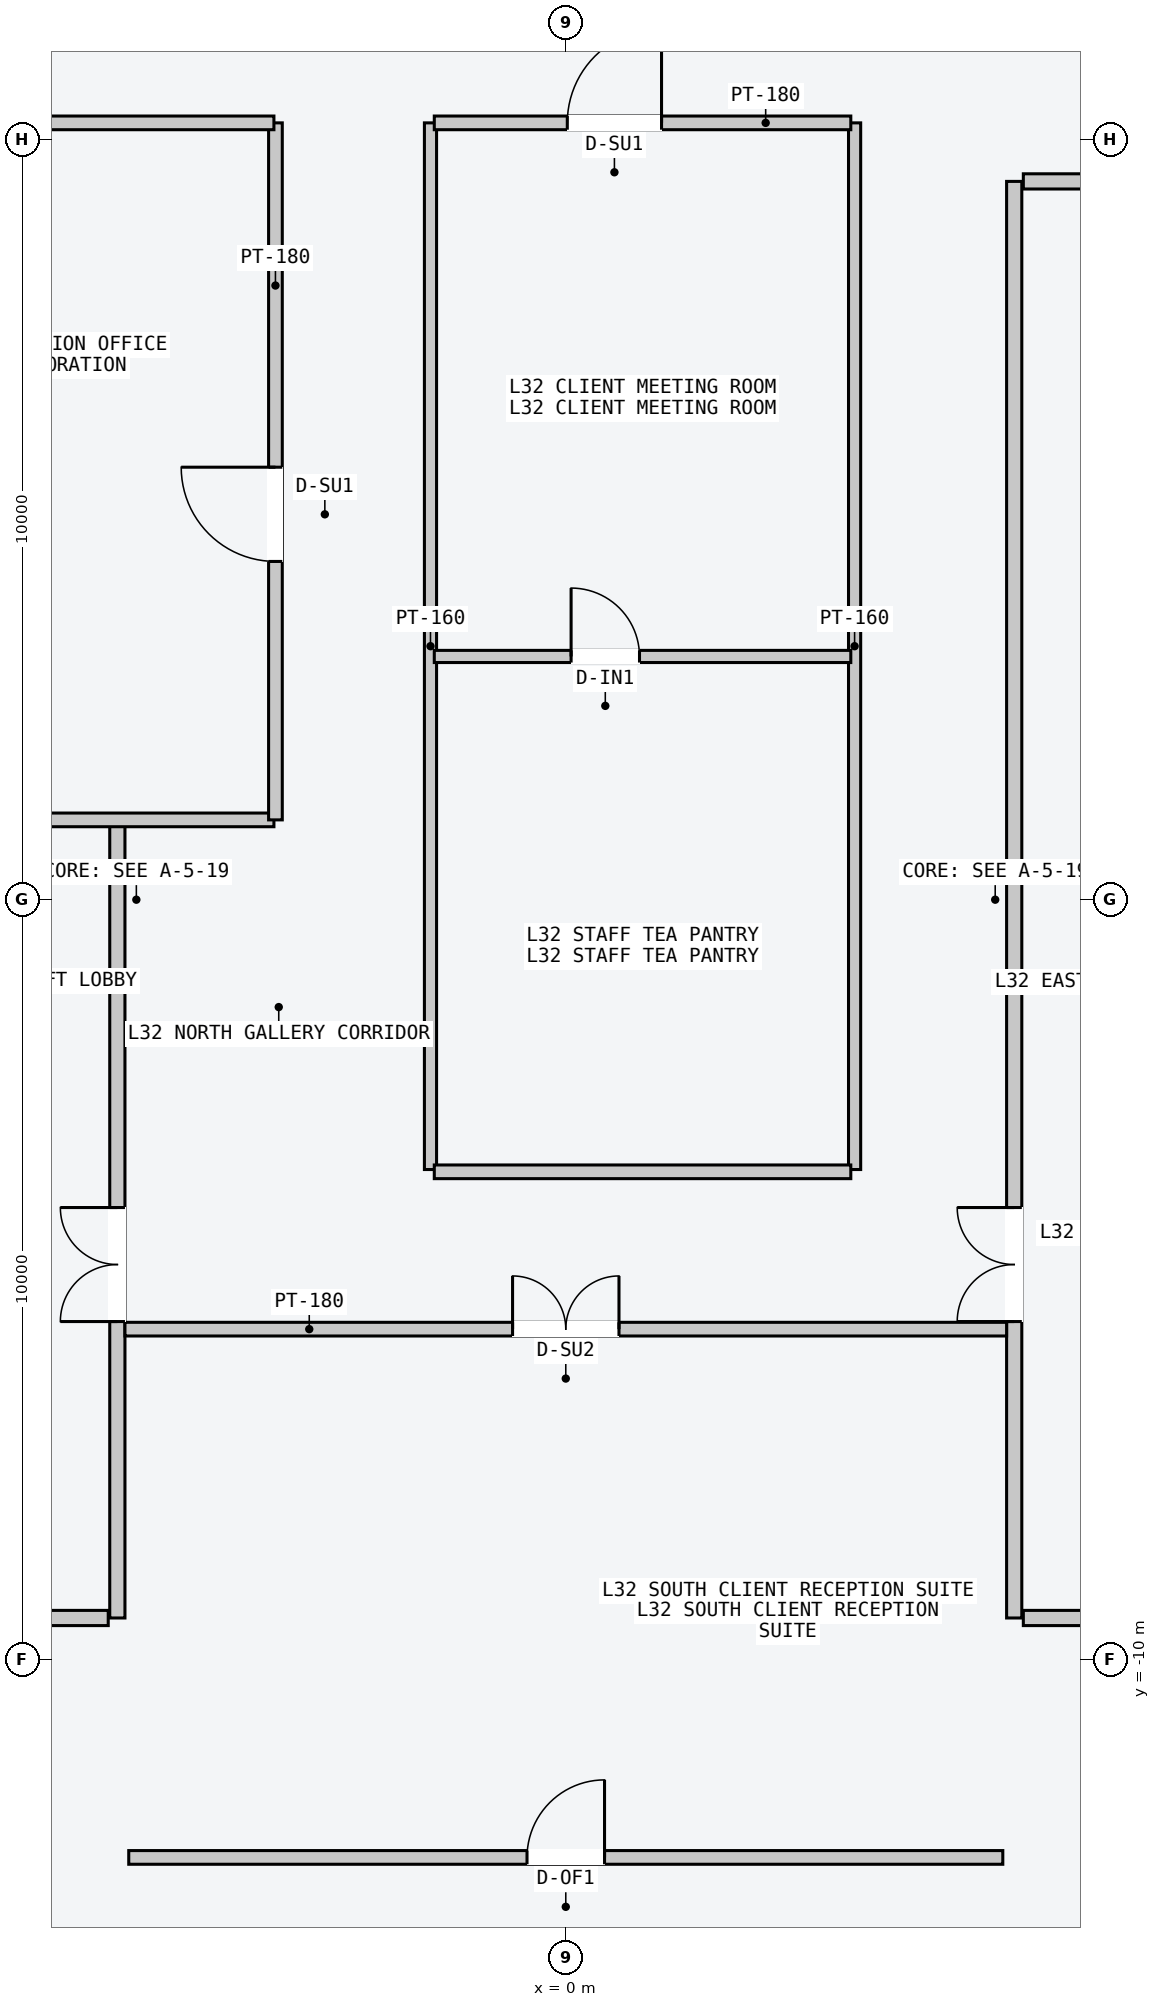
"""IFC4 building model, lengths in metres.
Left out: names, types, materials, properties, quantities, classifications, styles, units other than length and angle.
Written with IfcOpenShell. Run it as: python <this file> out.ifc"""

import sys

from ifc_helpers import new_model, si_unit, direction, frame, frame_2d, origin, place, context, subcontext, project, spatial, rectangle, extrude, element, fill, save


model = new_model("IFC4")
c1 = context("Model", 3, precision=1e-05, world=origin(), true_north=direction((0.0, 1.0)))
c2 = subcontext(c1, "Body", "Model", "MODEL_VIEW")
j1 = project(units=[si_unit("LENGTHUNIT", "METRE"), si_unit("PLANEANGLEUNIT", "RADIAN")], contexts=[c1])
p1 = place(None, origin())
s1 = spatial("IfcSite", under=j1, at=p1, CompositionType="ELEMENT")
p2 = place(p1, origin())
s2 = spatial("IfcBuilding", under=s1, at=p2, CompositionType="ELEMENT")
p3 = place(p2, frame((0.0, 0.0, 124.2)))
s3 = spatial("IfcBuildingStorey", under=s2, at=p3, CompositionType="ELEMENT", Elevation=124.2)
p4 = place(p3, frame((-5.9, -9.45, 0.0), z_axis=(0.0, 0.0, 1.0), x_axis=(0.0, 1.0, 0.0)))
e1 = element("IfcWall", 1, at=p4, inside=s3, PredefinedType="PARTITIONING", context=c2, shape_type="SweptSolid", body=[
    extrude(rectangle(XDim=10.5, YDim=0.2, at=frame_2d((5.25, 0.0))), origin(), (0.0, 0.0, 1.0), 3.4),
])
p5 = place(p4, frame((3.9, 0.0, 0.0)))
e2 = element("IfcOpeningElement", 2, at=p5, cuts=e1, PredefinedType="OPENING", context=c2, shape_type="SweptSolid", body=[
    extrude(rectangle(XDim=1.5, YDim=2.2, at=frame_2d((0.75, 1.1))), frame((0.0, 0.11, 0.0), z_axis=(0.0, -1.0, 0.0), x_axis=(1.0, 0.0, 0.0)), (0.0, 0.0, 1.0), 0.22),
])
p6 = place(p3, frame((-6.02, -9.45, 0.0), z_axis=(0.0, 0.0, 1.0), x_axis=(-1.0, 0.0, 0.0)))
e3 = element("IfcWall", 3, at=p6, inside=s3, PredefinedType="PARTITIONING", context=c2, shape_type="SweptSolid", body=[
    extrude(rectangle(XDim=1.8, YDim=0.2, at=frame_2d((0.9, 0.0))), origin(), (0.0, 0.0, 1.0), 3.4),
])
p7 = place(p3, frame((5.9, -9.45, 0.0), z_axis=(0.0, 0.0, 1.0), x_axis=(0.0, 1.0, 0.0)))
e4 = element("IfcWall", 4, at=p7, inside=s3, PredefinedType="PARTITIONING", context=c2, shape_type="SweptSolid", body=[
    extrude(rectangle(XDim=18.9, YDim=0.2, at=frame_2d((9.45, 0.0))), origin(), (0.0, 0.0, 1.0), 3.4),
])
p8 = place(p7, frame((3.9, 0.0, 0.0)))
e5 = element("IfcOpeningElement", 5, at=p8, cuts=e4, PredefinedType="OPENING", context=c2, shape_type="SweptSolid", body=[
    extrude(rectangle(XDim=1.5, YDim=2.2, at=frame_2d((0.75, 1.1))), frame((0.0, 0.11, 0.0), z_axis=(0.0, -1.0, 0.0), x_axis=(1.0, 0.0, 0.0)), (0.0, 0.0, 1.0), 0.22),
])
for number, where, z_axis, x_axis in (
    (6, (6.02, -9.45, 0.0), (0.0, 0.0, 1.0), (1.0, 0.0, 0.0)),
    (7, (6.02, 9.45, 0.0), (0.0, 0.0, 1.0), (1.0, 0.0, 0.0)),
):
    element("IfcWall", number, at=place(p3, frame(where, z_axis=z_axis, x_axis=x_axis)), inside=s3, PredefinedType="PARTITIONING", context=c2, shape_type="SweptSolid", body=[
        extrude(rectangle(XDim=1.8, YDim=0.2, at=frame_2d((0.9, 0.0))), origin(), (0.0, 0.0, 1.0), 3.4),
    ])
p9 = place(p3, frame((-10.05, 1.05, 0.0), z_axis=(0.0, 0.0, 1.0), x_axis=(1.0, 0.0, 0.0)))
e8 = element("IfcWall", 8, at=p9, inside=s3, PredefinedType="PARTITIONING", context=c2, shape_type="SweptSolid", body=[
    extrude(rectangle(XDim=6.21, YDim=0.18, at=frame_2d((3.105, 0.0))), origin(), (0.0, 0.0, 1.0), 3.4),
])
p10 = place(p3, frame((-3.82, 1.05, 0.0), z_axis=(0.0, 0.0, 1.0), x_axis=(0.0, 1.0, 0.0)))
e9 = element("IfcWall", 9, at=p10, inside=s3, PredefinedType="PARTITIONING", context=c2, shape_type="SweptSolid", body=[
    extrude(rectangle(XDim=9.17, YDim=0.18, at=frame_2d((4.585, 0.0))), origin(), (0.0, 0.0, 1.0), 3.4),
])
p11 = place(p10, frame((3.4, 0.0, 0.0)))
e10 = element("IfcOpeningElement", 10, at=p11, cuts=e9, PredefinedType="OPENING", context=c2, shape_type="SweptSolid", body=[
    extrude(rectangle(XDim=1.24, YDim=2.24, at=frame_2d((0.62, 1.12))), frame((0.0, 0.1, 0.0), z_axis=(0.0, -1.0, 0.0), x_axis=(1.0, 0.0, 0.0)), (0.0, 0.0, 1.0), 0.2),
])
p12 = place(p3, frame((-7.5, 10.22, 0.0), z_axis=(0.0, 0.0, 1.0), x_axis=(1.0, 0.0, 0.0)))
e11 = element("IfcWall", 11, at=p12, inside=s3, PredefinedType="PARTITIONING", context=c2, shape_type="SweptSolid", body=[
    extrude(rectangle(XDim=3.66, YDim=0.18, at=frame_2d((1.83, 0.0))), origin(), (0.0, 0.0, 1.0), 3.4),
])
for number, where, z_axis, x_axis in (
    (12, (-1.78, -3.55, 0.0), (0.0, 0.0, 1.0), (0.0, 1.0, 0.0)),
    (13, (3.8, -3.55, 0.0), (0.0, 0.0, 1.0), (0.0, 1.0, 0.0)),
):
    element("IfcWall", number, at=place(p3, frame(where, z_axis=z_axis, x_axis=x_axis)), inside=s3, PredefinedType="PARTITIONING", context=c2, shape_type="SweptSolid", body=[
        extrude(rectangle(XDim=13.77, YDim=0.16, at=frame_2d((6.885, 0.0))), origin(), (0.0, 0.0, 1.0), 3.4),
    ])
p13 = place(p3, frame((-1.73, -3.58, 0.0), z_axis=(0.0, 0.0, 1.0), x_axis=(1.0, 0.0, 0.0)))
e14 = element("IfcWall", 14, at=p13, inside=s3, PredefinedType="PARTITIONING", context=c2, shape_type="SweptSolid", body=[
    extrude(rectangle(XDim=5.48, YDim=0.18, at=frame_2d((2.74, 0.0))), origin(), (0.0, 0.0, 1.0), 3.4),
])
p14 = place(p3, frame((-1.73, 3.2, 0.0), z_axis=(0.0, 0.0, 1.0), x_axis=(1.0, 0.0, 0.0)))
e15 = element("IfcWall", 15, at=p14, inside=s3, PredefinedType="PARTITIONING", context=c2, shape_type="SweptSolid", body=[
    extrude(rectangle(XDim=5.48, YDim=0.16, at=frame_2d((2.74, 0.0))), origin(), (0.0, 0.0, 1.0), 3.4),
])
p15 = place(p14, frame((1.8, 0.0, 0.0)))
e16 = element("IfcOpeningElement", 16, at=p15, cuts=e15, PredefinedType="OPENING", context=c2, shape_type="SweptSolid", body=[
    extrude(rectangle(XDim=0.9, YDim=2.15, at=frame_2d((0.45, 1.075))), frame((0.0, 0.09, 0.0), z_axis=(0.0, -1.0, 0.0), x_axis=(1.0, 0.0, 0.0)), (0.0, 0.0, 1.0), 0.18),
])
p16 = place(p3, frame((-1.73, 10.22, 0.0), z_axis=(0.0, 0.0, 1.0), x_axis=(1.0, 0.0, 0.0)))
e17 = element("IfcWall", 17, at=p16, inside=s3, PredefinedType="PARTITIONING", context=c2, shape_type="SweptSolid", body=[
    extrude(rectangle(XDim=5.48, YDim=0.18, at=frame_2d((2.74, 0.0))), origin(), (0.0, 0.0, 1.0), 3.4),
])
p17 = place(p16, frame((1.75, 0.0, 0.0)))
e18 = element("IfcOpeningElement", 18, at=p17, cuts=e17, PredefinedType="OPENING", context=c2, shape_type="SweptSolid", body=[
    extrude(rectangle(XDim=1.24, YDim=2.24, at=frame_2d((0.62, 1.12))), frame((0.0, 0.1, 0.0), z_axis=(0.0, -1.0, 0.0), x_axis=(1.0, 0.0, 0.0)), (0.0, 0.0, 1.0), 0.2),
])
p18 = place(p3, frame((-5.8, -5.65, 0.0), z_axis=(0.0, 0.0, 1.0), x_axis=(1.0, 0.0, 0.0)))
e19 = element("IfcWall", 19, at=p18, inside=s3, PredefinedType="PARTITIONING", context=c2, shape_type="SweptSolid", body=[
    extrude(rectangle(XDim=11.6, YDim=0.18, at=frame_2d((5.8, 0.0))), origin(), (0.0, 0.0, 1.0), 3.4),
])
p19 = place(p18, frame((5.1, 0.0, 0.0)))
e20 = element("IfcOpeningElement", 20, at=p19, cuts=e19, PredefinedType="OPENING", context=c2, shape_type="SweptSolid", body=[
    extrude(rectangle(XDim=1.4, YDim=2.2, at=frame_2d((0.7, 1.1))), frame((0.0, 0.1, 0.0), z_axis=(0.0, -1.0, 0.0), x_axis=(1.0, 0.0, 0.0)), (0.0, 0.0, 1.0), 0.2),
])
p20 = place(p3, frame((-5.75, -12.6, 0.0), z_axis=(0.0, 0.0, 1.0), x_axis=(1.0, 0.0, 0.0)))
e21 = element("IfcWall", 21, at=p20, inside=s3, PredefinedType="PARTITIONING", context=c2, shape_type="SweptSolid", body=[
    extrude(rectangle(XDim=11.5, YDim=0.18, at=frame_2d((5.75, 0.0))), origin(), (0.0, 0.0, 1.0), 3.4),
])
p21 = place(p20, frame((5.24, 0.0, 0.0)))
e22 = element("IfcOpeningElement", 22, at=p21, cuts=e21, PredefinedType="OPENING", context=c2, shape_type="SweptSolid", body=[
    extrude(rectangle(XDim=1.02, YDim=2.2, at=frame_2d((0.51, 1.1))), frame((0.0, 0.1, 0.0), z_axis=(0.0, -1.0, 0.0), x_axis=(1.0, 0.0, 0.0)), (0.0, 0.0, 1.0), 0.2),
])
p22 = place(p5, origin())
e23 = element("IfcDoor", 23, at=p22, inside=s3, OperationType="DOUBLE_DOOR_SINGLE_SWING", PredefinedType="DOOR", context=c2, shape_type="SweptSolid", body=[
    extrude(rectangle(XDim=1.5, YDim=2.2, at=frame_2d((0.75, 1.1))), frame((0.0, 0.025, 0.0), z_axis=(0.0, -1.0, 0.0), x_axis=(1.0, 0.0, 0.0)), (0.0, 0.0, 1.0), 0.05),
])
fill(e2, e23)
p23 = place(p8, origin())
e24 = element("IfcDoor", 24, at=p23, inside=s3, OperationType="DOUBLE_DOOR_SINGLE_SWING", PredefinedType="DOOR", context=c2, shape_type="SweptSolid", body=[
    extrude(rectangle(XDim=1.5, YDim=2.2, at=frame_2d((0.75, 1.1))), frame((0.0, 0.025, 0.0), z_axis=(0.0, -1.0, 0.0), x_axis=(1.0, 0.0, 0.0)), (0.0, 0.0, 1.0), 0.05),
])
fill(e5, e24)
p24 = place(p11, origin())
e25 = element("IfcDoor", 25, at=p24, inside=s3, OperationType="SINGLE_SWING_RIGHT", PredefinedType="DOOR", context=c2, shape_type="SweptSolid", body=[
    extrude(rectangle(XDim=1.24, YDim=2.24, at=frame_2d((0.62, 1.12))), frame((0.0, 0.025, 0.0), z_axis=(0.0, -1.0, 0.0), x_axis=(1.0, 0.0, 0.0)), (0.0, 0.0, 1.0), 0.05),
])
fill(e10, e25)
p25 = place(p15, origin())
e26 = element("IfcDoor", 26, at=p25, inside=s3, OperationType="SINGLE_SWING_LEFT", PredefinedType="DOOR", context=c2, shape_type="SweptSolid", body=[
    extrude(rectangle(XDim=0.9, YDim=2.15, at=frame_2d((0.45, 1.075))), frame((0.0, 0.025, 0.0), z_axis=(0.0, -1.0, 0.0), x_axis=(1.0, 0.0, 0.0)), (0.0, 0.0, 1.0), 0.05),
])
fill(e16, e26)
p26 = place(p17, origin())
e27 = element("IfcDoor", 27, at=p26, inside=s3, OperationType="SINGLE_SWING_RIGHT", PredefinedType="DOOR", context=c2, shape_type="SweptSolid", body=[
    extrude(rectangle(XDim=1.24, YDim=2.24, at=frame_2d((0.62, 1.12))), frame((0.0, 0.025, 0.0), z_axis=(0.0, -1.0, 0.0), x_axis=(1.0, 0.0, 0.0)), (0.0, 0.0, 1.0), 0.05),
])
fill(e18, e27)
p27 = place(p19, origin())
e28 = element("IfcDoor", 28, at=p27, inside=s3, OperationType="DOUBLE_DOOR_SINGLE_SWING", PredefinedType="DOOR", context=c2, shape_type="SweptSolid", body=[
    extrude(rectangle(XDim=1.4, YDim=2.2, at=frame_2d((0.7, 1.1))), frame((0.0, 0.025, 0.0), z_axis=(0.0, -1.0, 0.0), x_axis=(1.0, 0.0, 0.0)), (0.0, 0.0, 1.0), 0.05),
])
fill(e20, e28)
p28 = place(p21, origin())
e29 = element("IfcDoor", 29, at=p28, inside=s3, OperationType="SINGLE_SWING_RIGHT", PredefinedType="DOOR", context=c2, shape_type="SweptSolid", body=[
    extrude(rectangle(XDim=1.02, YDim=2.2, at=frame_2d((0.51, 1.1))), frame((0.0, 0.025, 0.0), z_axis=(0.0, -1.0, 0.0), x_axis=(1.0, 0.0, 0.0)), (0.0, 0.0, 1.0), 0.05),
])
fill(e22, e29)
save(model, sys.argv[1])
